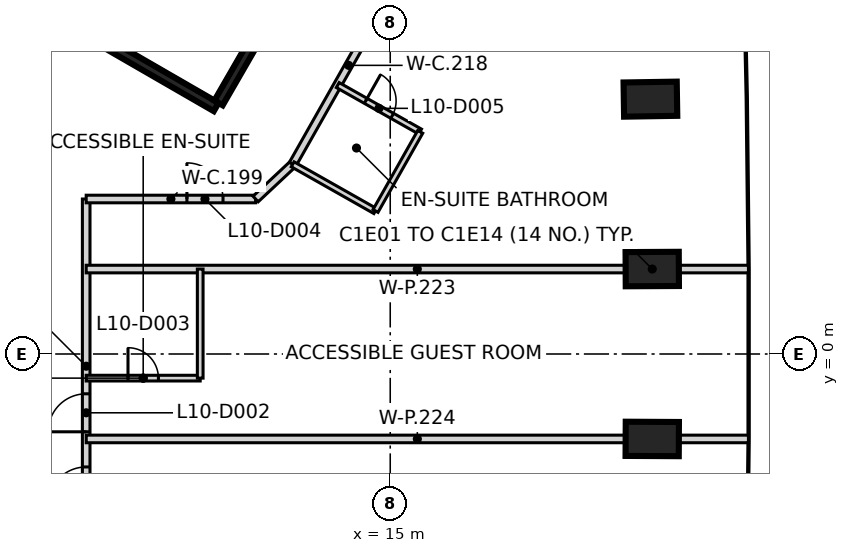
"""IFC4 building model, lengths in metres.
Left out: names, types, materials, properties, quantities, classifications, styles, units other than length and angle.
Written with IfcOpenShell. Run it as: python <this file> out.ifc"""

import sys

from ifc_helpers import new_model, si_unit, direction, frame, frame_2d, origin, origin_2d, place, context, subcontext, project, spatial, rectangle, extrude, element, fill, save


model = new_model("IFC4")
c1 = context("Model", 3, precision=1e-05, world=origin(), true_north=direction((0.0, 1.0)))
c2 = subcontext(c1, "Body", "Model", "MODEL_VIEW")
j1 = project(units=[si_unit("LENGTHUNIT", "METRE"), si_unit("PLANEANGLEUNIT", "RADIAN")], contexts=[c1])
p1 = place(None, origin())
s1 = spatial("IfcSite", under=j1, at=p1, CompositionType="ELEMENT")
p2 = place(p1, origin())
s2 = spatial("IfcBuilding", under=s1, at=p2, CompositionType="ELEMENT")
p3 = place(p2, frame((0.0, 0.0, 49.4)))
s3 = spatial("IfcBuildingStorey", under=s2, at=p3, CompositionType="ELEMENT", Elevation=49.4)
for number, where, z_axis, x_axis in (
    (1, (21.894, -2.235, -0.475), (0.0, 0.0, 1.0), (-1.0, 0.005, 0.0)),
    (2, (21.894, 2.235, -0.475), (0.0, 0.0, 1.0), (1.0, 0.005, 0.0)),
    (3, (21.846, 6.706, -0.475), (0.0, 0.0, 1.0), (1.0, 0.016, 0.0)),
):
    element("IfcColumn", number, at=place(p3, frame(where, z_axis=z_axis, x_axis=x_axis)), inside=s3, PredefinedType="COLUMN", context=c2, shape_type="SweptSolid", body=[
        extrude(rectangle(XDim=1.4, YDim=0.9, at=origin_2d()), origin(), (0.0, 0.0, 1.0), 3.6),
    ])
p4 = place(p3, frame((10.42, 6.498, 0.0), z_axis=(0.0, 0.0, 1.0), x_axis=(-0.866021906294, 0.500006057782, 0.0)))
e4 = element("IfcWall", 4, at=p4, inside=s3, PredefinedType="SHEAR", context=c2, shape_type="SweptSolid", body=[
    extrude(rectangle(XDim=11.55, YDim=0.25, at=frame_2d((5.775, 0.0))), origin(), (0.0, 0.0, 1.0), 3.125),
])
p5 = place(p4, frame((10.025, 0.0, 0.0)))
e5 = element("IfcOpeningElement", 5, at=p5, cuts=e4, PredefinedType="OPENING", context=c2, shape_type="SweptSolid", body=[
    extrude(rectangle(XDim=1.2, YDim=2.1, at=frame_2d((0.6, 1.05))), frame((0.0, 0.135, 0.0), z_axis=(0.0, -1.0, 0.0), x_axis=(1.0, 0.0, 0.0)), (0.0, 0.0, 1.0), 0.27),
])
p6 = place(p4, frame((8.725, 0.0, 0.0)))
e6 = element("IfcOpeningElement", 6, at=p6, cuts=e4, PredefinedType="OPENING", context=c2, shape_type="SweptSolid", body=[
    extrude(rectangle(XDim=1.2, YDim=2.1, at=frame_2d((0.6, 1.05))), frame((0.0, 0.135, 0.0), z_axis=(0.0, -1.0, 0.0), x_axis=(1.0, 0.0, 0.0)), (0.0, 0.0, 1.0), 0.27),
])
p7 = place(p3, frame((13.238, 11.378, 0.0), z_axis=(0.0, 0.0, 1.0), x_axis=(-0.500008851346, -0.866020293397, 0.0)))
e7 = element("IfcWall", 7, at=p7, inside=s3, PredefinedType="SHEAR", context=c2, shape_type="SweptSolid", body=[
    extrude(rectangle(XDim=5.51, YDim=0.25, at=frame_2d((2.755, 0.0))), origin(), (0.0, 0.0, 1.0), 3.125),
])
p8 = place(p3, frame((7.0, -4.721, 0.0), z_axis=(0.0, 0.0, 1.0), x_axis=(0.0, 1.0, 0.0)))
e8 = element("IfcWall", 8, at=p8, inside=s3, PredefinedType="PARTITIONING", context=c2, shape_type="SweptSolid", body=[
    extrude(rectangle(XDim=8.799, YDim=0.2, at=frame_2d((4.399, 0.0))), origin(), (0.0, 0.0, 1.0), 3.125),
])
p9 = place(p8, frame((0.749, 0.0, 0.0)))
e9 = element("IfcOpeningElement", 9, at=p9, cuts=e8, PredefinedType="OPENING", context=c2, shape_type="SweptSolid", body=[
    extrude(rectangle(XDim=1.0, YDim=2.1, at=frame_2d((0.5, 1.05))), frame((0.0, 0.11, 0.0), z_axis=(0.0, -1.0, 0.0), x_axis=(1.0, 0.0, 0.0)), (0.0, 0.0, 1.0), 0.22),
])
p10 = place(p8, frame((2.674, 0.0, 0.0)))
e10 = element("IfcOpeningElement", 10, at=p10, cuts=e8, PredefinedType="OPENING", context=c2, shape_type="SweptSolid", body=[
    extrude(rectangle(XDim=1.0, YDim=2.1, at=frame_2d((0.5, 1.05))), frame((0.0, 0.11, 0.0), z_axis=(0.0, -1.0, 0.0), x_axis=(1.0, 0.0, 0.0)), (0.0, 0.0, 1.0), 0.22),
])
p11 = place(p3, frame((7.0, 4.078, 0.0), z_axis=(0.0, 0.0, 1.0), x_axis=(1.0, 0.0, 0.0)))
e11 = element("IfcWall", 11, at=p11, inside=s3, PredefinedType="PARTITIONING", context=c2, shape_type="SweptSolid", body=[
    extrude(rectangle(XDim=4.458, YDim=0.2, at=frame_2d((2.229, 0.0))), origin(), (0.0, 0.0, 1.0), 3.125),
])
p12 = place(p11, frame((2.65, 0.0, 0.0)))
e12 = element("IfcOpeningElement", 12, at=p12, cuts=e11, PredefinedType="OPENING", context=c2, shape_type="SweptSolid", body=[
    extrude(rectangle(XDim=0.95, YDim=2.1, at=frame_2d((0.475, 1.05))), frame((0.0, 0.11, 0.0), z_axis=(0.0, -1.0, 0.0), x_axis=(1.0, 0.0, 0.0)), (0.0, 0.0, 1.0), 0.22),
])
p13 = place(p3, frame((11.458, 4.078, 0.0), z_axis=(0.0, 0.0, 1.0), x_axis=(0.729936032318, 0.683515463412, 0.0)))
e13 = element("IfcWall", 13, at=p13, inside=s3, PredefinedType="PARTITIONING", context=c2, shape_type="SweptSolid", body=[
    extrude(rectangle(XDim=1.336, YDim=0.2, at=frame_2d((0.668, 0.0))), origin(), (0.0, 0.0, 1.0), 3.125),
])
p14 = place(p3, frame((12.432, 4.992, 0.0), z_axis=(0.0, 0.0, 1.0), x_axis=(0.492790102015, 0.870148214591, 0.0)))
e14 = element("IfcWall", 14, at=p14, inside=s3, PredefinedType="PARTITIONING", context=c2, shape_type="SweptSolid", body=[
    extrude(rectangle(XDim=5.981, YDim=0.2, at=frame_2d((2.991, 0.0))), origin(), (0.0, 0.0, 1.0), 3.125),
])
p15 = place(p3, frame((7.0, 2.235, 0.0), z_axis=(0.0, 0.0, 1.0), x_axis=(1.0, 0.0, 0.0)))
e15 = element("IfcWall", 15, at=p15, inside=s3, PredefinedType="PARTITIONING", context=c2, shape_type="SweptSolid", body=[
    extrude(rectangle(XDim=17.425, YDim=0.2, at=frame_2d((8.712, 0.0))), origin(), (0.0, 0.0, 1.0), 3.125),
])
p16 = place(p3, frame((7.001, -2.235, 0.0), z_axis=(0.0, 0.0, 1.0), x_axis=(1.0, 0.0, 0.0)))
e16 = element("IfcWall", 16, at=p16, inside=s3, PredefinedType="PARTITIONING", context=c2, shape_type="SweptSolid", body=[
    extrude(rectangle(XDim=17.424, YDim=0.2, at=frame_2d((8.712, 0.0))), origin(), (0.0, 0.0, 1.0), 3.125),
])
p17 = place(p3, frame((7.0, -0.635, 0.0), z_axis=(0.0, 0.0, 1.0), x_axis=(1.0, 0.0, 0.0)))
e17 = element("IfcWall", 17, at=p17, inside=s3, PredefinedType="PARTITIONING", context=c2, shape_type="SweptSolid", body=[
    extrude(rectangle(XDim=3.0, YDim=0.15, at=frame_2d((1.5, 0.0))), origin(), (0.0, 0.0, 1.0), 3.125),
])
p18 = place(p17, frame((1.1, 0.0, 0.0)))
e18 = element("IfcOpeningElement", 18, at=p18, cuts=e17, PredefinedType="OPENING", context=c2, shape_type="SweptSolid", body=[
    extrude(rectangle(XDim=0.8, YDim=2.1, at=frame_2d((0.4, 1.05))), frame((0.0, 0.085, 0.0), z_axis=(0.0, -1.0, 0.0), x_axis=(1.0, 0.0, 0.0)), (0.0, 0.0, 1.0), 0.17),
])
p19 = place(p3, frame((10.0, -0.635, 0.0), z_axis=(0.0, 0.0, 1.0), x_axis=(0.0, 1.0, 0.0)))
e19 = element("IfcWall", 19, at=p19, inside=s3, PredefinedType="PARTITIONING", context=c2, shape_type="SweptSolid", body=[
    extrude(rectangle(XDim=2.87, YDim=0.15, at=frame_2d((1.435, 0.0))), origin(), (0.0, 0.0, 1.0), 3.125),
])
p20 = place(p3, frame((12.433, 4.991, 0.0), z_axis=(0.0, 0.0, 1.0), x_axis=(0.870173052757, -0.49274624124, 0.0)))
e20 = element("IfcWall", 20, at=p20, inside=s3, PredefinedType="PARTITIONING", context=c2, shape_type="SweptSolid", body=[
    extrude(rectangle(XDim=2.498, YDim=0.15, at=frame_2d((1.249, 0.0))), origin(), (0.0, 0.0, 1.0), 3.125),
])
p21 = place(p3, frame((13.619, 7.076, 0.0), z_axis=(0.0, 0.0, 1.0), x_axis=(0.870725399165, -0.491769538758, 0.0)))
e21 = element("IfcWall", 21, at=p21, inside=s3, PredefinedType="PARTITIONING", context=c2, shape_type="SweptSolid", body=[
    extrude(rectangle(XDim=2.489, YDim=0.15, at=frame_2d((1.244, 0.0))), origin(), (0.0, 0.0, 1.0), 3.125),
])
p22 = place(p21, frame((0.845, 0.0, 0.0)))
e22 = element("IfcOpeningElement", 22, at=p22, cuts=e21, PredefinedType="OPENING", context=c2, shape_type="SweptSolid", body=[
    extrude(rectangle(XDim=0.8, YDim=2.1, at=frame_2d((0.4, 1.05))), frame((0.0, 0.085, 0.0), z_axis=(0.0, -1.0, 0.0), x_axis=(1.0, 0.0, 0.0)), (0.0, 0.0, 1.0), 0.17),
])
p23 = place(p3, frame((14.613, 3.764, 0.0), z_axis=(0.0, 0.0, 1.0), x_axis=(0.492121164181, 0.870526713987, 0.0)))
e23 = element("IfcWall", 23, at=p23, inside=s3, PredefinedType="PARTITIONING", context=c2, shape_type="SweptSolid", body=[
    extrude(rectangle(XDim=2.392, YDim=0.15, at=frame_2d((1.196, 0.0))), origin(), (0.0, 0.0, 1.0), 3.125),
])
p24 = place(p9, frame((1.0, 0.0, 0.0), z_axis=(0.0, 0.0, 1.0), x_axis=(-1.0, 0.0, 0.0)))
e24 = element("IfcDoor", 24, at=p24, inside=s3, OperationType="SINGLE_SWING_LEFT", PredefinedType="DOOR", context=c2, shape_type="SweptSolid", body=[
    extrude(rectangle(XDim=1.0, YDim=2.1, at=frame_2d((0.5, 1.05))), frame((0.0, 0.025, 0.0), z_axis=(0.0, -1.0, 0.0), x_axis=(1.0, 0.0, 0.0)), (0.0, 0.0, 1.0), 0.05),
])
fill(e9, e24)
p25 = place(p10, frame((1.0, 0.0, 0.0), z_axis=(0.0, 0.0, 1.0), x_axis=(-1.0, 0.0, 0.0)))
e25 = element("IfcDoor", 25, at=p25, inside=s3, OperationType="SINGLE_SWING_LEFT", PredefinedType="DOOR", context=c2, shape_type="SweptSolid", body=[
    extrude(rectangle(XDim=1.0, YDim=2.1, at=frame_2d((0.5, 1.05))), frame((0.0, 0.025, 0.0), z_axis=(0.0, -1.0, 0.0), x_axis=(1.0, 0.0, 0.0)), (0.0, 0.0, 1.0), 0.05),
])
fill(e10, e25)
p26 = place(p18, origin())
e26 = element("IfcDoor", 26, at=p26, inside=s3, OperationType="SINGLE_SWING_LEFT", PredefinedType="DOOR", context=c2, shape_type="SweptSolid", body=[
    extrude(rectangle(XDim=0.8, YDim=2.1, at=frame_2d((0.4, 1.05))), frame((0.0, 0.025, 0.0), z_axis=(0.0, -1.0, 0.0), x_axis=(1.0, 0.0, 0.0)), (0.0, 0.0, 1.0), 0.05),
])
fill(e18, e26)
p27 = place(p12, origin())
e27 = element("IfcDoor", 27, at=p27, inside=s3, OperationType="SINGLE_SWING_LEFT", PredefinedType="DOOR", context=c2, shape_type="SweptSolid", body=[
    extrude(rectangle(XDim=0.95, YDim=2.1, at=frame_2d((0.475, 1.05))), frame((0.0, 0.025, 0.0), z_axis=(0.0, -1.0, 0.0), x_axis=(1.0, 0.0, 0.0)), (0.0, 0.0, 1.0), 0.05),
])
fill(e12, e27)
p28 = place(p22, origin())
e28 = element("IfcDoor", 28, at=p28, inside=s3, OperationType="SINGLE_SWING_LEFT", PredefinedType="DOOR", context=c2, shape_type="SweptSolid", body=[
    extrude(rectangle(XDim=0.8, YDim=2.1, at=frame_2d((0.4, 1.05))), frame((0.0, 0.025, 0.0), z_axis=(0.0, -1.0, 0.0), x_axis=(1.0, 0.0, 0.0)), (0.0, 0.0, 1.0), 0.05),
])
fill(e22, e28)
save(model, sys.argv[1])
